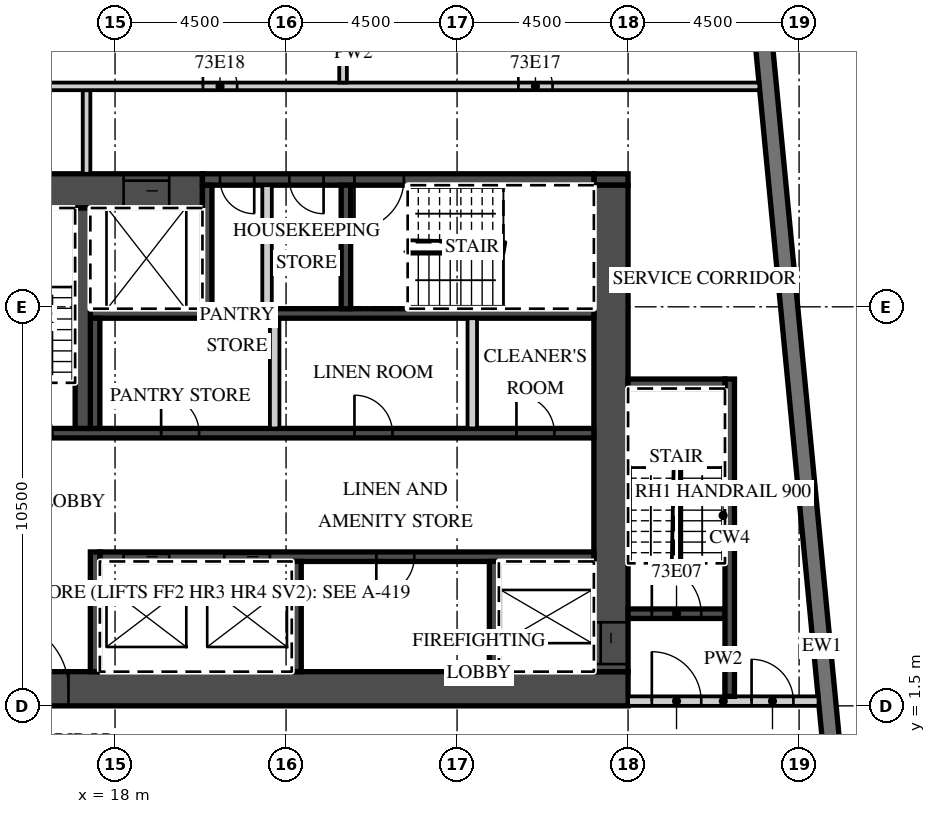
"""IFC4 building model, lengths in metres.
Left out: names, types, materials, properties, quantities, classifications, styles, units other than length and angle.
Written with IfcOpenShell. Run it as: python <this file> out.ifc"""

import sys

from ifc_helpers import new_model, si_unit, direction, frame, frame_2d, origin, place, context, subcontext, project, spatial, rectangle, extrude, element, fill, save


model = new_model("IFC4")
c1 = context("Model", 3, precision=1e-05, world=origin(), true_north=direction((0.0, 1.0)))
c2 = subcontext(c1, "Body", "Model", "MODEL_VIEW")
j1 = project(units=[si_unit("LENGTHUNIT", "METRE"), si_unit("PLANEANGLEUNIT", "RADIAN")], contexts=[c1])
p1 = place(None, origin())
s1 = spatial("IfcSite", under=j1, at=p1, CompositionType="ELEMENT")
p2 = place(p1, origin())
s2 = spatial("IfcBuilding", under=s1, at=p2, CompositionType="ELEMENT")
p3 = place(p2, frame((0.0, 0.0, 291.6)))
s3 = spatial("IfcBuildingStorey", under=s2, at=p3, CompositionType="ELEMENT", Elevation=291.6)
p4 = place(p3, frame((38.132, -12.858, 0.0), z_axis=(0.0, 0.0, 1.0), x_axis=(-0.095847749461, 0.995396006082, 0.0)))
e1 = element("IfcWall", 1, at=p4, inside=s3, PredefinedType="SOLIDWALL", context=c2, shape_type="SweptSolid", body=[
    extrude(rectangle(XDim=32.0, YDim=0.45, at=frame_2d((16.0, 0.0))), origin(), (0.0, 0.0, 1.0), 3.02),
])
p5 = place(p3, frame((13.5, 1.95, 0.0), z_axis=(0.0, 0.0, 1.0), x_axis=(1.0, 0.0, 0.0)))
e2 = element("IfcWall", 2, at=p5, inside=s3, PredefinedType="SHEAR", context=c2, shape_type="SweptSolid", body=[
    extrude(rectangle(XDim=18.0, YDim=0.9, at=frame_2d((9.0, 0.0))), origin(), (0.0, 0.0, 1.0), 3.02),
])
p6 = place(p5, frame((1.475, 0.0, 0.0)))
e3 = element("IfcOpeningElement", 3, at=p6, cuts=e2, PredefinedType="OPENING", context=c2, shape_type="SweptSolid", body=[
    extrude(rectangle(XDim=1.8, YDim=2.1, at=frame_2d((0.9, 1.05))), frame((0.0, 0.46, 0.0), z_axis=(0.0, -1.0, 0.0), x_axis=(1.0, 0.0, 0.0)), (0.0, 0.0, 1.0), 0.92),
])
p7 = place(p3, frame((13.5, 15.05, 0.0), z_axis=(0.0, 0.0, 1.0), x_axis=(1.0, 0.0, 0.0)))
e4 = element("IfcWall", 4, at=p7, inside=s3, PredefinedType="SHEAR", context=c2, shape_type="SweptSolid", body=[
    extrude(rectangle(XDim=6.8, YDim=0.9, at=frame_2d((3.4, 0.0))), origin(), (0.0, 0.0, 1.0), 3.02),
])
p8 = place(p7, frame((4.725, 0.0, 0.0)))
e5 = element("IfcOpeningElement", 5, at=p8, cuts=e4, PredefinedType="OPENING", context=c2, shape_type="SweptSolid", body=[
    extrude(rectangle(XDim=1.2, YDim=2.1, at=frame_2d((0.6, 1.05))), frame((0.0, 0.46, 0.0), z_axis=(0.0, -1.0, 0.0), x_axis=(1.0, 0.0, 0.0)), (0.0, 0.0, 1.0), 0.92),
])
p9 = place(p3, frame((30.6, 15.35, 0.0), z_axis=(0.0, 0.0, 1.0), x_axis=(1.0, 0.0, 0.0)))
e6 = element("IfcWall", 6, at=p9, inside=s3, PredefinedType="SHEAR", context=c2, shape_type="SweptSolid", body=[
    extrude(rectangle(XDim=0.9, YDim=0.3, at=frame_2d((0.45, 0.0))), origin(), (0.0, 0.0, 1.0), 3.02),
])
p10 = place(p3, frame((20.3, 15.35, 0.0), z_axis=(0.0, 0.0, 1.0), x_axis=(1.0, 0.0, 0.0)))
e7 = element("IfcWall", 7, at=p10, inside=s3, PredefinedType="SHEAR", context=c2, shape_type="SweptSolid", body=[
    extrude(rectangle(XDim=10.3, YDim=0.3, at=frame_2d((5.15, 0.0))), origin(), (0.0, 0.0, 1.0), 3.02),
])
p11 = place(p10, frame((4.0, 0.0, 0.0)))
e8 = element("IfcOpeningElement", 8, at=p11, cuts=e7, PredefinedType="OPENING", context=c2, shape_type="SweptSolid", body=[
    extrude(rectangle(XDim=1.3, YDim=2.1, at=frame_2d((0.65, 1.05))), frame((0.0, 0.16, 0.0), z_axis=(0.0, -1.0, 0.0), x_axis=(1.0, 0.0, 0.0)), (0.0, 0.0, 1.0), 0.32),
])
p12 = place(p10, frame((2.288, 0.0, 0.0)))
e9 = element("IfcOpeningElement", 9, at=p12, cuts=e7, PredefinedType="OPENING", context=c2, shape_type="SweptSolid", body=[
    extrude(rectangle(XDim=0.9, YDim=2.1, at=frame_2d((0.45, 1.05))), frame((0.0, 0.16, 0.0), z_axis=(0.0, -1.0, 0.0), x_axis=(1.0, 0.0, 0.0)), (0.0, 0.0, 1.0), 0.32),
])
p13 = place(p10, frame((0.462, 0.0, 0.0)))
e10 = element("IfcOpeningElement", 10, at=p13, cuts=e7, PredefinedType="OPENING", context=c2, shape_type="SweptSolid", body=[
    extrude(rectangle(XDim=0.9, YDim=2.1, at=frame_2d((0.45, 1.05))), frame((0.0, 0.16, 0.0), z_axis=(0.0, -1.0, 0.0), x_axis=(1.0, 0.0, 0.0)), (0.0, 0.0, 1.0), 0.32),
])
p14 = place(p3, frame((31.05, 2.4, 0.0), z_axis=(0.0, 0.0, 1.0), x_axis=(0.0, 1.0, 0.0)))
e11 = element("IfcWall", 11, at=p14, inside=s3, PredefinedType="SHEAR", context=c2, shape_type="SweptSolid", body=[
    extrude(rectangle(XDim=12.8, YDim=0.9, at=frame_2d((6.4, 0.0))), origin(), (0.0, 0.0, 1.0), 3.02),
])
p15 = place(p14, frame((0.2, 0.0, 0.0)))
e12 = element("IfcOpeningElement", 12, at=p15, cuts=e11, PredefinedType="OPENING", context=c2, shape_type="SweptSolid", body=[
    extrude(rectangle(XDim=1.1, YDim=2.1, at=frame_2d((0.55, 1.05))), frame((0.0, 0.46, 0.0), z_axis=(0.0, -1.0, 0.0), x_axis=(1.0, 0.0, 0.0)), (0.0, 0.0, 1.0), 0.92),
])
p16 = place(p3, frame((17.6, 5.425, 0.0), z_axis=(0.0, 0.0, 1.0), x_axis=(1.0, 0.0, 0.0)))
e13 = element("IfcWall", 13, at=p16, inside=s3, PredefinedType="SHEAR", context=c2, shape_type="SweptSolid", body=[
    extrude(rectangle(XDim=13.0, YDim=0.25, at=frame_2d((6.5, 0.0))), origin(), (0.0, 0.0, 1.0), 3.02),
])
p17 = place(p16, frame((3.275, 0.0, 0.0)))
e14 = element("IfcOpeningElement", 14, at=p17, cuts=e13, PredefinedType="OPENING", context=c2, shape_type="SweptSolid", body=[
    extrude(rectangle(XDim=1.2, YDim=2.1, at=frame_2d((0.6, 1.05))), frame((0.0, 0.135, 0.0), z_axis=(0.0, -1.0, 0.0), x_axis=(1.0, 0.0, 0.0)), (0.0, 0.0, 1.0), 0.27),
])
p18 = place(p16, frame((0.625, 0.0, 0.0)))
e15 = element("IfcOpeningElement", 15, at=p18, cuts=e13, PredefinedType="OPENING", context=c2, shape_type="SweptSolid", body=[
    extrude(rectangle(XDim=1.2, YDim=2.1, at=frame_2d((0.6, 1.05))), frame((0.0, 0.135, 0.0), z_axis=(0.0, -1.0, 0.0), x_axis=(1.0, 0.0, 0.0)), (0.0, 0.0, 1.0), 0.27),
])
p19 = place(p16, frame((7.275, 0.0, 0.0)))
e16 = element("IfcOpeningElement", 16, at=p19, cuts=e13, PredefinedType="OPENING", context=c2, shape_type="SweptSolid", body=[
    extrude(rectangle(XDim=1.0, YDim=2.1, at=frame_2d((0.5, 1.05))), frame((0.0, 0.135, 0.0), z_axis=(0.0, -1.0, 0.0), x_axis=(1.0, 0.0, 0.0)), (0.0, 0.0, 1.0), 0.27),
])
p20 = place(p3, frame((17.475, 2.4, 0.0), z_axis=(0.0, 0.0, 1.0), x_axis=(0.0, 1.0, 0.0)))
e17 = element("IfcWall", 17, at=p20, inside=s3, PredefinedType="SHEAR", context=c2, shape_type="SweptSolid", body=[
    extrude(rectangle(XDim=3.15, YDim=0.25, at=frame_2d((1.575, 0.0))), origin(), (0.0, 0.0, 1.0), 3.02),
])
for number, where, z_axis, x_axis in (
    (18, (27.975, 2.4, 0.0), (0.0, 0.0, 1.0), (0.0, 1.0, 0.0)),
    (19, (22.775, 2.4, 0.0), (0.0, 0.0, 1.0), (0.0, 1.0, 0.0)),
):
    element("IfcWall", number, at=place(p3, frame(where, z_axis=z_axis, x_axis=x_axis)), inside=s3, PredefinedType="SHEAR", context=c2, shape_type="SweptSolid", body=[
        extrude(rectangle(XDim=2.9, YDim=0.25, at=frame_2d((1.45, 0.0))), origin(), (0.0, 0.0, 1.0), 3.02),
    ])
p21 = place(p3, frame((14.4, 8.675, 0.0), z_axis=(0.0, 0.0, 1.0), x_axis=(1.0, 0.0, 0.0)))
e20 = element("IfcWall", 20, at=p21, inside=s3, PredefinedType="SHEAR", context=c2, shape_type="SweptSolid", body=[
    extrude(rectangle(XDim=16.2, YDim=0.25, at=frame_2d((8.1, 0.0))), origin(), (0.0, 0.0, 1.0), 3.02),
])
p22 = place(p21, frame((0.65, 0.0, 0.0)))
e21 = element("IfcOpeningElement", 21, at=p22, cuts=e20, PredefinedType="OPENING", context=c2, shape_type="SweptSolid", body=[
    extrude(rectangle(XDim=1.3, YDim=2.1, at=frame_2d((0.65, 1.05))), frame((0.0, 0.135, 0.0), z_axis=(0.0, -1.0, 0.0), x_axis=(1.0, 0.0, 0.0)), (0.0, 0.0, 1.0), 0.27),
])
p23 = place(p21, frame((14.163, 0.0, 0.0)))
e22 = element("IfcOpeningElement", 22, at=p23, cuts=e20, PredefinedType="OPENING", context=c2, shape_type="SweptSolid", body=[
    extrude(rectangle(XDim=1.0, YDim=2.1, at=frame_2d((0.5, 1.05))), frame((0.0, 0.135, 0.0), z_axis=(0.0, -1.0, 0.0), x_axis=(1.0, 0.0, 0.0)), (0.0, 0.0, 1.0), 0.27),
])
p24 = place(p21, frame((9.9, 0.0, 0.0)))
e23 = element("IfcOpeningElement", 23, at=p24, cuts=e20, PredefinedType="OPENING", context=c2, shape_type="SweptSolid", body=[
    extrude(rectangle(XDim=1.0, YDim=2.1, at=frame_2d((0.5, 1.05))), frame((0.0, 0.135, 0.0), z_axis=(0.0, -1.0, 0.0), x_axis=(1.0, 0.0, 0.0)), (0.0, 0.0, 1.0), 0.27),
])
p25 = place(p21, frame((4.812, 0.0, 0.0)))
e24 = element("IfcOpeningElement", 24, at=p25, cuts=e20, PredefinedType="OPENING", context=c2, shape_type="SweptSolid", body=[
    extrude(rectangle(XDim=1.0, YDim=2.1, at=frame_2d((0.5, 1.05))), frame((0.0, 0.135, 0.0), z_axis=(0.0, -1.0, 0.0), x_axis=(1.0, 0.0, 0.0)), (0.0, 0.0, 1.0), 0.27),
])
p26 = place(p3, frame((17.35, 11.825, 0.0), z_axis=(0.0, 0.0, 1.0), x_axis=(1.0, 0.0, 0.0)))
e25 = element("IfcWall", 25, at=p26, inside=s3, PredefinedType="SHEAR", context=c2, shape_type="SweptSolid", body=[
    extrude(rectangle(XDim=13.25, YDim=0.25, at=frame_2d((6.625, 0.0))), origin(), (0.0, 0.0, 1.0), 3.02),
])
p27 = place(p3, frame((17.475, 8.8, 0.0), z_axis=(0.0, 0.0, 1.0), x_axis=(0.0, 1.0, 0.0)))
e26 = element("IfcWall", 26, at=p27, inside=s3, PredefinedType="SHEAR", context=c2, shape_type="SweptSolid", body=[
    extrude(rectangle(XDim=2.9, YDim=0.25, at=frame_2d((1.45, 0.0))), origin(), (0.0, 0.0, 1.0), 3.02),
])
for number, where, z_axis, x_axis in (
    (27, (27.4, 8.8, 0.0), (0.0, 0.0, 1.0), (0.0, 1.0, 0.0)),
    (28, (22.2, 8.8, 0.0), (0.0, 0.0, 1.0), (0.0, 1.0, 0.0)),
):
    element("IfcWall", number, at=place(p3, frame(where, z_axis=z_axis, x_axis=x_axis)), inside=s3, PredefinedType="PARTITIONING", context=c2, shape_type="SweptSolid", body=[
        extrude(rectangle(XDim=2.9, YDim=0.25, at=frame_2d((1.45, 0.0))), origin(), (0.0, 0.0, 1.0), 3.02),
    ])
p28 = place(p3, frame((17.15, 8.8, 0.0), z_axis=(0.0, 0.0, 1.0), x_axis=(0.0, 1.0, 0.0)))
e29 = element("IfcWall", 29, at=p28, inside=s3, PredefinedType="SHEAR", context=c2, shape_type="SweptSolid", body=[
    extrude(rectangle(XDim=5.8, YDim=0.4, at=frame_2d((2.9, 0.0))), origin(), (0.0, 0.0, 1.0), 3.02),
])
for number, where, z_axis, x_axis in (
    (30, (20.425, 11.95, 0.0), (0.0, 0.0, 1.0), (0.0, 1.0, 0.0)),
    (31, (24.075, 11.95, 0.0), (0.0, 0.0, 1.0), (0.0, 1.0, 0.0)),
):
    element("IfcWall", number, at=place(p3, frame(where, z_axis=z_axis, x_axis=x_axis)), inside=s3, PredefinedType="SHEAR", context=c2, shape_type="SweptSolid", body=[
        extrude(rectangle(XDim=3.25, YDim=0.25, at=frame_2d((1.625, 0.0))), origin(), (0.0, 0.0, 1.0), 3.02),
    ])
p29 = place(p3, frame((22.0, 11.95, 0.0), z_axis=(0.0, 0.0, 1.0), x_axis=(0.0, 1.0, 0.0)))
e32 = element("IfcWall", 32, at=p29, inside=s3, PredefinedType="PARTITIONING", context=c2, shape_type="SweptSolid", body=[
    extrude(rectangle(XDim=3.25, YDim=0.25, at=frame_2d((1.625, 0.0))), origin(), (0.0, 0.0, 1.0), 3.02),
])
p30 = place(p3, frame((31.5, 1.625, 0.0), z_axis=(0.0, 0.0, 1.0), x_axis=(1.0, 0.0, 0.0)))
e33 = element("IfcWall", 33, at=p30, inside=s3, PredefinedType="PARTITIONING", context=c2, shape_type="SweptSolid", body=[
    extrude(rectangle(XDim=5.012, YDim=0.25, at=frame_2d((2.506, 0.0))), origin(), (0.0, 0.0, 1.0), 3.02),
])
p31 = place(p30, frame((0.625, 0.0, 0.0)))
e34 = element("IfcOpeningElement", 34, at=p31, cuts=e33, PredefinedType="OPENING", context=c2, shape_type="SweptSolid", body=[
    extrude(rectangle(XDim=1.3, YDim=2.1, at=frame_2d((0.65, 1.05))), frame((0.0, 0.135, 0.0), z_axis=(0.0, -1.0, 0.0), x_axis=(1.0, 0.0, 0.0)), (0.0, 0.0, 1.0), 0.27),
])
p32 = place(p30, frame((3.25, 0.0, 0.0)))
e35 = element("IfcOpeningElement", 35, at=p32, cuts=e33, PredefinedType="OPENING", context=c2, shape_type="SweptSolid", body=[
    extrude(rectangle(XDim=1.1, YDim=2.1, at=frame_2d((0.55, 1.05))), frame((0.0, 0.135, 0.0), z_axis=(0.0, -1.0, 0.0), x_axis=(1.0, 0.0, 0.0)), (0.0, 0.0, 1.0), 0.27),
])
p33 = place(p3, frame((31.5, 3.925, 0.0), z_axis=(0.0, 0.0, 1.0), x_axis=(1.0, 0.0, 0.0)))
e36 = element("IfcWall", 36, at=p33, inside=s3, PredefinedType="SHEAR", context=c2, shape_type="SweptSolid", body=[
    extrude(rectangle(XDim=2.55, YDim=0.25, at=frame_2d((1.275, 0.0))), origin(), (0.0, 0.0, 1.0), 3.02),
])
p34 = place(p33, frame((0.625, 0.0, 0.0)))
e37 = element("IfcOpeningElement", 37, at=p34, cuts=e36, PredefinedType="OPENING", context=c2, shape_type="SweptSolid", body=[
    extrude(rectangle(XDim=1.3, YDim=2.1, at=frame_2d((0.65, 1.05))), frame((0.0, 0.135, 0.0), z_axis=(0.0, -1.0, 0.0), x_axis=(1.0, 0.0, 0.0)), (0.0, 0.0, 1.0), 0.27),
])
p35 = place(p3, frame((34.175, 1.75, 0.0), z_axis=(0.0, 0.0, 1.0), x_axis=(0.0, 1.0, 0.0)))
e38 = element("IfcWall", 38, at=p35, inside=s3, PredefinedType="SHEAR", context=c2, shape_type="SweptSolid", body=[
    extrude(rectangle(XDim=8.35, YDim=0.25, at=frame_2d((4.175, 0.0))), origin(), (0.0, 0.0, 1.0), 3.02),
])
p36 = place(p3, frame((31.5, 9.975, 0.0), z_axis=(0.0, 0.0, 1.0), x_axis=(1.0, 0.0, 0.0)))
e39 = element("IfcWall", 39, at=p36, inside=s3, PredefinedType="SHEAR", context=c2, shape_type="SweptSolid", body=[
    extrude(rectangle(XDim=2.55, YDim=0.25, at=frame_2d((1.275, 0.0))), origin(), (0.0, 0.0, 1.0), 3.02),
])
p37 = place(p3, frame((17.25, 15.5, 0.0), z_axis=(0.0, 0.0, 1.0), x_axis=(0.0, 1.0, 0.0)))
e40 = element("IfcWall", 40, at=p37, inside=s3, PredefinedType="PARTITIONING", context=c2, shape_type="SweptSolid", body=[
    extrude(rectangle(XDim=2.2, YDim=0.2, at=frame_2d((1.1, 0.0))), origin(), (0.0, 0.0, 1.0), 3.02),
])
p38 = place(p3, frame((13.6, 17.8, 0.0), z_axis=(0.0, 0.0, 1.0), x_axis=(1.0, 0.0, 0.0)))
e41 = element("IfcWall", 41, at=p38, inside=s3, PredefinedType="PARTITIONING", context=c2, shape_type="SweptSolid", body=[
    extrude(rectangle(XDim=21.354, YDim=0.2, at=frame_2d((10.677, 0.0))), origin(), (0.0, 0.0, 1.0), 3.02),
])
p39 = place(p38, frame((15.012, 0.0, 0.0)))
e42 = element("IfcOpeningElement", 42, at=p39, cuts=e41, PredefinedType="OPENING", context=c2, shape_type="SweptSolid", body=[
    extrude(rectangle(XDim=0.9, YDim=2.1, at=frame_2d((0.45, 1.05))), frame((0.0, 0.11, 0.0), z_axis=(0.0, -1.0, 0.0), x_axis=(1.0, 0.0, 0.0)), (0.0, 0.0, 1.0), 0.22),
])
p40 = place(p38, frame((6.712, 0.0, 0.0)))
e43 = element("IfcOpeningElement", 43, at=p40, cuts=e41, PredefinedType="OPENING", context=c2, shape_type="SweptSolid", body=[
    extrude(rectangle(XDim=0.9, YDim=2.1, at=frame_2d((0.45, 1.05))), frame((0.0, 0.11, 0.0), z_axis=(0.0, -1.0, 0.0), x_axis=(1.0, 0.0, 0.0)), (0.0, 0.0, 1.0), 0.22),
])
p41 = place(p3, frame((24.0, 17.9, 0.0), z_axis=(0.0, 0.0, 1.0), x_axis=(0.0, 1.0, 0.0)))
e44 = element("IfcWall", 44, at=p41, inside=s3, PredefinedType="PARTITIONING", context=c2, shape_type="SweptSolid", body=[
    extrude(rectangle(XDim=3.597, YDim=0.2, at=frame_2d((1.798, 0.0))), origin(), (0.0, 0.0, 1.0), 3.02),
])
p42 = place(p17, origin())
e45 = element("IfcDoor", 45, at=p42, inside=s3, OperationType="SLIDING_TO_RIGHT", PredefinedType="DOOR", context=c2, shape_type="SweptSolid", body=[
    extrude(rectangle(XDim=1.2, YDim=2.1, at=frame_2d((0.6, 1.05))), frame((0.0, 0.025, 0.0), z_axis=(0.0, -1.0, 0.0), x_axis=(1.0, 0.0, 0.0)), (0.0, 0.0, 1.0), 0.05),
])
fill(e14, e45)
p43 = place(p18, origin())
e46 = element("IfcDoor", 46, at=p43, inside=s3, OperationType="SLIDING_TO_LEFT", PredefinedType="DOOR", context=c2, shape_type="SweptSolid", body=[
    extrude(rectangle(XDim=1.2, YDim=2.1, at=frame_2d((0.6, 1.05))), frame((0.0, 0.025, 0.0), z_axis=(0.0, -1.0, 0.0), x_axis=(1.0, 0.0, 0.0)), (0.0, 0.0, 1.0), 0.05),
])
fill(e15, e46)
p44 = place(p8, origin())
e47 = element("IfcDoor", 47, at=p44, inside=s3, OperationType="SLIDING_TO_LEFT", PredefinedType="DOOR", context=c2, shape_type="SweptSolid", body=[
    extrude(rectangle(XDim=1.2, YDim=2.1, at=frame_2d((0.6, 1.05))), frame((0.0, 0.025, 0.0), z_axis=(0.0, -1.0, 0.0), x_axis=(1.0, 0.0, 0.0)), (0.0, 0.0, 1.0), 0.05),
])
fill(e5, e47)
p45 = place(p15, origin())
e48 = element("IfcDoor", 48, at=p45, inside=s3, OperationType="SLIDING_TO_LEFT", PredefinedType="DOOR", context=c2, shape_type="SweptSolid", body=[
    extrude(rectangle(XDim=1.1, YDim=2.1, at=frame_2d((0.55, 1.05))), frame((0.0, 0.025, 0.0), z_axis=(0.0, -1.0, 0.0), x_axis=(1.0, 0.0, 0.0)), (0.0, 0.0, 1.0), 0.05),
])
fill(e12, e48)
p46 = place(p6, origin())
e49 = element("IfcDoor", 49, at=p46, inside=s3, OperationType="DOUBLE_DOOR_DOUBLE_SWING", PredefinedType="DOOR", context=c2, shape_type="SweptSolid", body=[
    extrude(rectangle(XDim=1.8, YDim=2.1, at=frame_2d((0.9, 1.05))), frame((0.0, 0.025, 0.0), z_axis=(0.0, -1.0, 0.0), x_axis=(1.0, 0.0, 0.0)), (0.0, 0.0, 1.0), 0.05),
])
fill(e3, e49)
p47 = place(p31, origin())
e50 = element("IfcDoor", 50, at=p47, inside=s3, OperationType="SINGLE_SWING_LEFT", PredefinedType="DOOR", context=c2, shape_type="SweptSolid", body=[
    extrude(rectangle(XDim=1.3, YDim=2.1, at=frame_2d((0.65, 1.05))), frame((0.0, 0.025, 0.0), z_axis=(0.0, -1.0, 0.0), x_axis=(1.0, 0.0, 0.0)), (0.0, 0.0, 1.0), 0.05),
])
fill(e34, e50)
p48 = place(p34, origin())
e51 = element("IfcDoor", 51, at=p48, inside=s3, OperationType="SINGLE_SWING_LEFT", PredefinedType="DOOR", context=c2, shape_type="SweptSolid", body=[
    extrude(rectangle(XDim=1.3, YDim=2.1, at=frame_2d((0.65, 1.05))), frame((0.0, 0.025, 0.0), z_axis=(0.0, -1.0, 0.0), x_axis=(1.0, 0.0, 0.0)), (0.0, 0.0, 1.0), 0.05),
])
fill(e37, e51)
p49 = place(p32, origin())
e52 = element("IfcDoor", 52, at=p49, inside=s3, OperationType="SINGLE_SWING_LEFT", PredefinedType="DOOR", context=c2, shape_type="SweptSolid", body=[
    extrude(rectangle(XDim=1.1, YDim=2.1, at=frame_2d((0.55, 1.05))), frame((0.0, 0.025, 0.0), z_axis=(0.0, -1.0, 0.0), x_axis=(1.0, 0.0, 0.0)), (0.0, 0.0, 1.0), 0.05),
])
fill(e35, e52)
p50 = place(p11, origin())
e53 = element("IfcDoor", 53, at=p50, inside=s3, OperationType="SINGLE_SWING_LEFT", PredefinedType="DOOR", context=c2, shape_type="SweptSolid", body=[
    extrude(rectangle(XDim=1.3, YDim=2.1, at=frame_2d((0.65, 1.05))), frame((0.0, 0.025, 0.0), z_axis=(0.0, -1.0, 0.0), x_axis=(1.0, 0.0, 0.0)), (0.0, 0.0, 1.0), 0.05),
])
fill(e8, e53)
p51 = place(p12, origin())
e54 = element("IfcDoor", 54, at=p51, inside=s3, OperationType="SINGLE_SWING_RIGHT", PredefinedType="DOOR", context=c2, shape_type="SweptSolid", body=[
    extrude(rectangle(XDim=0.9, YDim=2.1, at=frame_2d((0.45, 1.05))), frame((0.0, 0.025, 0.0), z_axis=(0.0, -1.0, 0.0), x_axis=(1.0, 0.0, 0.0)), (0.0, 0.0, 1.0), 0.05),
])
fill(e9, e54)
p52 = place(p13, origin())
e55 = element("IfcDoor", 55, at=p52, inside=s3, OperationType="SINGLE_SWING_RIGHT", PredefinedType="DOOR", context=c2, shape_type="SweptSolid", body=[
    extrude(rectangle(XDim=0.9, YDim=2.1, at=frame_2d((0.45, 1.05))), frame((0.0, 0.025, 0.0), z_axis=(0.0, -1.0, 0.0), x_axis=(1.0, 0.0, 0.0)), (0.0, 0.0, 1.0), 0.05),
])
fill(e10, e55)
p53 = place(p23, origin())
e56 = element("IfcDoor", 56, at=p53, inside=s3, OperationType="SINGLE_SWING_LEFT", PredefinedType="DOOR", context=c2, shape_type="SweptSolid", body=[
    extrude(rectangle(XDim=1.0, YDim=2.1, at=frame_2d((0.5, 1.05))), frame((0.0, 0.025, 0.0), z_axis=(0.0, -1.0, 0.0), x_axis=(1.0, 0.0, 0.0)), (0.0, 0.0, 1.0), 0.05),
])
fill(e22, e56)
p54 = place(p24, origin())
e57 = element("IfcDoor", 57, at=p54, inside=s3, OperationType="SINGLE_SWING_LEFT", PredefinedType="DOOR", context=c2, shape_type="SweptSolid", body=[
    extrude(rectangle(XDim=1.0, YDim=2.1, at=frame_2d((0.5, 1.05))), frame((0.0, 0.025, 0.0), z_axis=(0.0, -1.0, 0.0), x_axis=(1.0, 0.0, 0.0)), (0.0, 0.0, 1.0), 0.05),
])
fill(e23, e57)
p55 = place(p25, origin())
e58 = element("IfcDoor", 58, at=p55, inside=s3, OperationType="SINGLE_SWING_LEFT", PredefinedType="DOOR", context=c2, shape_type="SweptSolid", body=[
    extrude(rectangle(XDim=1.0, YDim=2.1, at=frame_2d((0.5, 1.05))), frame((0.0, 0.025, 0.0), z_axis=(0.0, -1.0, 0.0), x_axis=(1.0, 0.0, 0.0)), (0.0, 0.0, 1.0), 0.05),
])
fill(e24, e58)
p56 = place(p19, origin())
e59 = element("IfcDoor", 59, at=p56, inside=s3, OperationType="SINGLE_SWING_LEFT", PredefinedType="DOOR", context=c2, shape_type="SweptSolid", body=[
    extrude(rectangle(XDim=1.0, YDim=2.1, at=frame_2d((0.5, 1.05))), frame((0.0, 0.025, 0.0), z_axis=(0.0, -1.0, 0.0), x_axis=(1.0, 0.0, 0.0)), (0.0, 0.0, 1.0), 0.05),
])
fill(e16, e59)
p57 = place(p39, origin())
e60 = element("IfcDoor", 60, at=p57, inside=s3, OperationType="SINGLE_SWING_LEFT", PredefinedType="DOOR", context=c2, shape_type="SweptSolid", body=[
    extrude(rectangle(XDim=0.9, YDim=2.1, at=frame_2d((0.45, 1.05))), frame((0.0, 0.025, 0.0), z_axis=(0.0, -1.0, 0.0), x_axis=(1.0, 0.0, 0.0)), (0.0, 0.0, 1.0), 0.05),
])
fill(e42, e60)
p58 = place(p40, origin())
e61 = element("IfcDoor", 61, at=p58, inside=s3, OperationType="SINGLE_SWING_LEFT", PredefinedType="DOOR", context=c2, shape_type="SweptSolid", body=[
    extrude(rectangle(XDim=0.9, YDim=2.1, at=frame_2d((0.45, 1.05))), frame((0.0, 0.025, 0.0), z_axis=(0.0, -1.0, 0.0), x_axis=(1.0, 0.0, 0.0)), (0.0, 0.0, 1.0), 0.05),
])
fill(e43, e61)
save(model, sys.argv[1])
